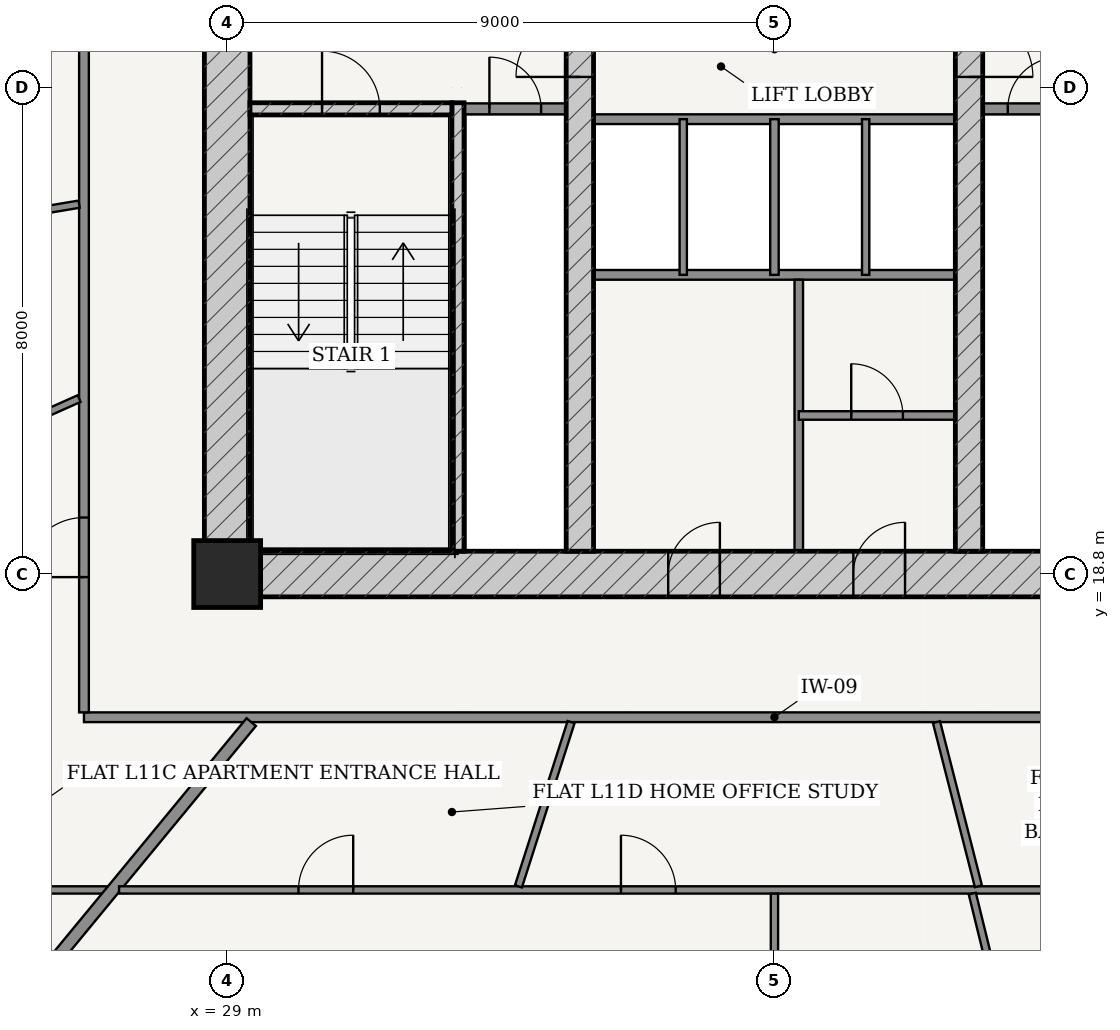
"""IFC4 building model, lengths in metres.
Left out: names, types, materials, properties, quantities, classifications, styles, units other than length and angle.
Written with IfcOpenShell. Run it as: python <this file> out.ifc"""

import sys

from ifc_helpers import new_model, si_unit, direction, frame, frame_2d, origin, origin_2d, place, context, subcontext, project, spatial, rectangle, extrude, source, transform, mapped, element, fill, save


model = new_model("IFC4")
c1 = context("Model", 3, precision=1e-05, world=origin(), true_north=direction((-0.2419218956, 0.970295726276)))
c2 = subcontext(c1, "Body", "Model", "MODEL_VIEW")
j1 = project(units=[si_unit("LENGTHUNIT", "METRE"), si_unit("PLANEANGLEUNIT", "RADIAN")], contexts=[c1])
p1 = place(None, origin())
s1 = spatial("IfcSite", under=j1, at=p1, CompositionType="ELEMENT")
p2 = place(p1, origin())
s2 = spatial("IfcBuilding", under=s1, at=p2, CompositionType="ELEMENT")
p3 = place(p2, frame((0.0, 0.0, 45.6)))
s3 = spatial("IfcBuildingStorey", under=s2, at=p3, CompositionType="ELEMENT", Elevation=45.6)
p4 = place(p3, frame((29.0, 18.8, 0.0), z_axis=(0.0, 0.0, 1.0), x_axis=(1.0, 0.0, 0.0)))
e1 = element("IfcColumn", 1, at=p4, inside=s3, PredefinedType="COLUMN", context=c2, shape_type="SweptSolid", body=[
    extrude(rectangle(XDim=1.1, YDim=1.1, at=origin_2d()), origin(), (0.0, 0.0, 1.0), 3.6),
])
p5 = place(p3, frame((28.625, 18.8, 0.0), z_axis=(0.0, 0.0, 1.0), x_axis=(1.0, 0.0, 0.0)))
e2 = element("IfcWall", 2, at=p5, inside=s3, PredefinedType="SHEAR", context=c2, shape_type="SweptSolid", body=[
    extrude(rectangle(XDim=18.75, YDim=0.75, at=frame_2d((9.375, 0.0))), origin(), (0.0, 0.0, 1.0), 3.32),
])
p6 = place(p5, frame((7.627, 0.0, 0.0)))
e3 = element("IfcOpeningElement", 3, at=p6, cuts=e2, PredefinedType="OPENING", context=c2, shape_type="SweptSolid", body=[
    extrude(rectangle(XDim=0.85, YDim=2.1, at=frame_2d((0.425, 1.05))), frame((0.0, 0.385, 0.0), z_axis=(0.0, -1.0, 0.0), x_axis=(1.0, 0.0, 0.0)), (0.0, 0.0, 1.0), 0.77),
])
p7 = place(p5, frame((10.673, 0.0, 0.0)))
e4 = element("IfcOpeningElement", 4, at=p7, cuts=e2, PredefinedType="OPENING", context=c2, shape_type="SweptSolid", body=[
    extrude(rectangle(XDim=0.85, YDim=2.1, at=frame_2d((0.425, 1.05))), frame((0.0, 0.385, 0.0), z_axis=(0.0, -1.0, 0.0), x_axis=(1.0, 0.0, 0.0)), (0.0, 0.0, 1.0), 0.77),
])
p8 = place(p3, frame((29.0, 19.175, 0.0), z_axis=(0.0, 0.0, 1.0), x_axis=(0.0, 1.0, 0.0)))
e5 = element("IfcWall", 5, at=p8, inside=s3, PredefinedType="SHEAR", context=c2, shape_type="SweptSolid", body=[
    extrude(rectangle(XDim=15.25, YDim=0.75, at=frame_2d((7.625, 0.0))), origin(), (0.0, 0.0, 1.0), 3.32),
])
p9 = place(p8, frame((9.875, 0.0, 0.0)))
e6 = element("IfcOpeningElement", 6, at=p9, cuts=e5, PredefinedType="OPENING", context=c2, shape_type="SweptSolid", body=[
    extrude(rectangle(XDim=1.5, YDim=2.2, at=frame_2d((0.75, 1.1))), frame((0.0, 0.385, 0.0), z_axis=(0.0, -1.0, 0.0), x_axis=(1.0, 0.0, 0.0)), (0.0, 0.0, 1.0), 0.77),
])
p10 = place(p3, frame((32.795, 19.175, 0.0), z_axis=(0.0, 0.0, 1.0), x_axis=(0.0, 1.0, 0.0)))
e7 = element("IfcWall", 7, at=p10, inside=s3, PredefinedType="SOLIDWALL", context=c2, shape_type="SweptSolid", body=[
    extrude(rectangle(XDim=7.375, YDim=0.2, at=frame_2d((3.688, 0.0))), origin(), (0.0, 0.0, 1.0), 3.32),
])
p11 = place(p3, frame((29.375, 26.45, 0.0), z_axis=(0.0, 0.0, 1.0), x_axis=(1.0, 0.0, 0.0)))
e8 = element("IfcWall", 8, at=p11, inside=s3, PredefinedType="SOLIDWALL", context=c2, shape_type="SweptSolid", body=[
    extrude(rectangle(XDim=3.32, YDim=0.2, at=frame_2d((1.66, 0.0))), origin(), (0.0, 0.0, 1.0), 3.32),
])
p12 = place(p11, frame((1.185, 0.0, 0.0)))
e9 = element("IfcOpeningElement", 9, at=p12, cuts=e8, PredefinedType="OPENING", context=c2, shape_type="SweptSolid", body=[
    extrude(rectangle(XDim=0.95, YDim=2.15, at=frame_2d((0.475, 1.075))), frame((0.0, 0.11, 0.0), z_axis=(0.0, -1.0, 0.0), x_axis=(1.0, 0.0, 0.0)), (0.0, 0.0, 1.0), 0.22),
])
p13 = place(p3, frame((34.8, 19.175, 0.0), z_axis=(0.0, 0.0, 1.0), x_axis=(0.0, 1.0, 0.0)))
e10 = element("IfcWall", 10, at=p13, inside=s3, PredefinedType="SHEAR", context=c2, shape_type="SweptSolid", body=[
    extrude(rectangle(XDim=15.25, YDim=0.45, at=frame_2d((7.625, 0.0))), origin(), (0.0, 0.0, 1.0), 3.32),
])
p14 = place(p13, frame((7.8, 0.0, 0.0)))
e11 = element("IfcOpeningElement", 11, at=p14, cuts=e10, PredefinedType="OPENING", context=c2, shape_type="SweptSolid", body=[
    extrude(rectangle(XDim=1.05, YDim=2.15, at=frame_2d((0.525, 1.075))), frame((0.0, 0.235, 0.0), z_axis=(0.0, -1.0, 0.0), x_axis=(1.0, 0.0, 0.0)), (0.0, 0.0, 1.0), 0.47),
])
p15 = place(p3, frame((41.2, 19.175, 0.0), z_axis=(0.0, 0.0, 1.0), x_axis=(0.0, 1.0, 0.0)))
e12 = element("IfcWall", 12, at=p15, inside=s3, PredefinedType="SHEAR", context=c2, shape_type="SweptSolid", body=[
    extrude(rectangle(XDim=15.25, YDim=0.45, at=frame_2d((7.625, 0.0))), origin(), (0.0, 0.0, 1.0), 3.32),
])
p16 = place(p15, frame((7.8, 0.0, 0.0)))
e13 = element("IfcOpeningElement", 13, at=p16, cuts=e12, PredefinedType="OPENING", context=c2, shape_type="SweptSolid", body=[
    extrude(rectangle(XDim=1.05, YDim=2.15, at=frame_2d((0.525, 1.075))), frame((0.0, 0.235, 0.0), z_axis=(0.0, -1.0, 0.0), x_axis=(1.0, 0.0, 0.0)), (0.0, 0.0, 1.0), 0.47),
])
p17 = place(p3, frame((32.9, 26.45, 0.0), z_axis=(0.0, 0.0, 1.0), x_axis=(1.0, 0.0, 0.0)))
e14 = element("IfcWall", 14, at=p17, inside=s3, PredefinedType="PARTITIONING", context=c2, shape_type="SweptSolid", body=[
    extrude(rectangle(XDim=1.675, YDim=0.18, at=frame_2d((0.837, 0.0))), origin(), (0.0, 0.0, 1.0), 3.32),
])
p18 = place(p17, frame((0.413, 0.0, 0.0)))
e15 = element("IfcOpeningElement", 15, at=p18, cuts=e14, PredefinedType="OPENING", context=c2, shape_type="SweptSolid", body=[
    extrude(rectangle(XDim=0.85, YDim=2.1, at=frame_2d((0.425, 1.05))), frame((0.0, 0.1, 0.0), z_axis=(0.0, -1.0, 0.0), x_axis=(1.0, 0.0, 0.0)), (0.0, 0.0, 1.0), 0.2),
])
p19 = place(p3, frame((41.425, 26.45, 0.0), z_axis=(0.0, 0.0, 1.0), x_axis=(1.0, 0.0, 0.0)))
e16 = element("IfcWall", 16, at=p19, inside=s3, PredefinedType="PARTITIONING", context=c2, shape_type="SweptSolid", body=[
    extrude(rectangle(XDim=1.675, YDim=0.18, at=frame_2d((0.837, 0.0))), origin(), (0.0, 0.0, 1.0), 3.32),
])
p20 = place(p19, frame((0.413, 0.0, 0.0)))
e17 = element("IfcOpeningElement", 17, at=p20, cuts=e16, PredefinedType="OPENING", context=c2, shape_type="SweptSolid", body=[
    extrude(rectangle(XDim=0.85, YDim=2.1, at=frame_2d((0.425, 1.05))), frame((0.0, 0.1, 0.0), z_axis=(0.0, -1.0, 0.0), x_axis=(1.0, 0.0, 0.0)), (0.0, 0.0, 1.0), 0.2),
])
for number, where, z_axis, x_axis in (
    (18, (35.025, 26.28, 0.0), (0.0, 0.0, 1.0), (1.0, 0.0, 0.0)),
    (19, (35.025, 23.72, 0.0), (0.0, 0.0, 1.0), (1.0, 0.0, 0.0)),
):
    element("IfcWall", number, at=place(p3, frame(where, z_axis=z_axis, x_axis=x_axis)), inside=s3, PredefinedType="PARTITIONING", context=c2, shape_type="SweptSolid", body=[
        extrude(rectangle(XDim=5.95, YDim=0.16, at=frame_2d((2.975, 0.0))), origin(), (0.0, 0.0, 1.0), 3.32),
    ])
p21 = place(p3, frame((36.5, 23.72, 0.0), z_axis=(0.0, 0.0, 1.0), x_axis=(0.0, 1.0, 0.0)))
e20 = element("IfcWall", 20, at=p21, inside=s3, PredefinedType="PARTITIONING", context=c2, shape_type="SweptSolid", body=[
    extrude(rectangle(XDim=2.56, YDim=0.12, at=frame_2d((1.28, 0.0))), origin(), (0.0, 0.0, 1.0), 3.32),
])
p22 = place(p3, frame((38.0, 23.72, 0.0), z_axis=(0.0, 0.0, 1.0), x_axis=(0.0, 1.0, 0.0)))
e21 = element("IfcWall", 21, at=p22, inside=s3, PredefinedType="PARTITIONING", context=c2, shape_type="SweptSolid", body=[
    extrude(rectangle(XDim=2.56, YDim=0.14, at=frame_2d((1.28, 0.0))), origin(), (0.0, 0.0, 1.0), 3.32),
])
p23 = place(p3, frame((39.5, 23.72, 0.0), z_axis=(0.0, 0.0, 1.0), x_axis=(0.0, 1.0, 0.0)))
e22 = element("IfcWall", 22, at=p23, inside=s3, PredefinedType="PARTITIONING", context=c2, shape_type="SweptSolid", body=[
    extrude(rectangle(XDim=2.56, YDim=0.12, at=frame_2d((1.28, 0.0))), origin(), (0.0, 0.0, 1.0), 3.32),
])
p24 = place(p3, frame((38.4, 19.175, 0.0), z_axis=(0.0, 0.0, 1.0), x_axis=(0.0, 1.0, 0.0)))
e23 = element("IfcWall", 23, at=p24, inside=s3, PredefinedType="PARTITIONING", context=c2, shape_type="SweptSolid", body=[
    extrude(rectangle(XDim=4.465, YDim=0.14, at=frame_2d((2.232, 0.0))), origin(), (0.0, 0.0, 1.0), 3.32),
])
p25 = place(p3, frame((38.4, 21.407, 0.0), z_axis=(0.0, 0.0, 1.0), x_axis=(1.0, 0.0, 0.0)))
e24 = element("IfcWall", 24, at=p25, inside=s3, PredefinedType="PARTITIONING", context=c2, shape_type="SweptSolid", body=[
    extrude(rectangle(XDim=2.575, YDim=0.14, at=frame_2d((1.288, 0.0))), origin(), (0.0, 0.0, 1.0), 3.32),
])
p26 = place(p25, frame((0.863, 0.0, 0.0)))
e25 = element("IfcOpeningElement", 25, at=p26, cuts=e24, PredefinedType="OPENING", context=c2, shape_type="SweptSolid", body=[
    extrude(rectangle(XDim=0.85, YDim=2.1, at=frame_2d((0.425, 1.05))), frame((0.0, 0.08, 0.0), z_axis=(0.0, -1.0, 0.0), x_axis=(1.0, 0.0, 0.0)), (0.0, 0.0, 1.0), 0.16),
])
p27 = place(p3, frame((26.645, 16.445, 0.0), z_axis=(0.0, 0.0, 1.0), x_axis=(1.0, 0.0, 0.0)))
e26 = element("IfcWall", 26, at=p27, inside=s3, PredefinedType="PARTITIONING", context=c2, shape_type="SweptSolid", body=[
    extrude(rectangle(XDim=22.71, YDim=0.16, at=frame_2d((11.355, 0.0))), origin(), (0.0, 0.0, 1.0), 2.688),
])
p28 = place(p27, frame((19.962, 0.0, 0.0)))
e27 = element("IfcOpeningElement", 27, at=p28, cuts=e26, PredefinedType="OPENING", context=c2, shape_type="SweptSolid", body=[
    extrude(rectangle(XDim=0.98, YDim=2.2, at=frame_2d((0.49, 1.1))), frame((0.0, 0.09, 0.0), z_axis=(0.0, -1.0, 0.0), x_axis=(1.0, 0.0, 0.0)), (0.0, 0.0, 1.0), 0.18),
])
p29 = place(p3, frame((26.645, 16.525, 0.0), z_axis=(0.0, 0.0, 1.0), x_axis=(0.0, 1.0, 0.0)))
e28 = element("IfcWall", 28, at=p29, inside=s3, PredefinedType="PARTITIONING", context=c2, shape_type="SweptSolid", body=[
    extrude(rectangle(XDim=20.55, YDim=0.16, at=frame_2d((10.275, 0.0))), origin(), (0.0, 0.0, 1.0), 2.688),
])
p30 = place(p29, frame((2.224, 0.0, 0.0)))
e29 = element("IfcOpeningElement", 29, at=p30, cuts=e28, PredefinedType="OPENING", context=c2, shape_type="SweptSolid", body=[
    extrude(rectangle(XDim=0.98, YDim=2.2, at=frame_2d((0.49, 1.1))), frame((0.0, 0.09, 0.0), z_axis=(0.0, -1.0, 0.0), x_axis=(1.0, 0.0, 0.0)), (0.0, 0.0, 1.0), 0.18),
])
p31 = place(p3, frame((27.018, 13.605, 0.0), z_axis=(0.0, 0.0, 1.0), x_axis=(-1.0, 0.0, 0.0)))
e30 = element("IfcWall", 30, at=p31, inside=s3, PredefinedType="PARTITIONING", context=c2, shape_type="SweptSolid", body=[
    extrude(rectangle(XDim=3.213, YDim=0.12, at=frame_2d((1.606, 0.0))), origin(), (0.0, 0.0, 1.0), 2.688),
])
p32 = place(p3, frame((26.565, 24.883, 0.0), z_axis=(0.0, 0.0, 1.0), x_axis=(-0.986224611599, -0.165411654596, 0.0)))
e31 = element("IfcWall", 31, at=p32, inside=s3, PredefinedType="PARTITIONING", context=c2, shape_type="SweptSolid", body=[
    extrude(rectangle(XDim=2.736, YDim=0.12, at=frame_2d((1.368, 0.0))), origin(), (0.0, 0.0, 1.0), 2.688),
])
p33 = place(p3, frame((26.565, 21.685, 0.0), z_axis=(0.0, 0.0, 1.0), x_axis=(-0.912840085104, -0.408317252914, 0.0)))
e32 = element("IfcWall", 32, at=p33, inside=s3, PredefinedType="PARTITIONING", context=c2, shape_type="SweptSolid", body=[
    extrude(rectangle(XDim=2.961, YDim=0.12, at=frame_2d((1.481, 0.0))), origin(), (0.0, 0.0, 1.0), 3.32),
])
p34 = place(p33, frame((1.051, 0.0, 0.0)))
e33 = element("IfcOpeningElement", 33, at=p34, cuts=e32, PredefinedType="OPENING", context=c2, shape_type="SweptSolid", body=[
    extrude(rectangle(XDim=0.86, YDim=2.15, at=frame_2d((0.43, 1.075))), frame((0.0, 0.07, 0.0), z_axis=(0.0, -1.0, 0.0), x_axis=(1.0, 0.0, 0.0)), (0.0, 0.0, 1.0), 0.14),
])
p35 = place(p3, frame((29.396, 16.365, 0.0), z_axis=(0.0, 0.0, 1.0), x_axis=(-0.636186165667, -0.771535587393, 0.0)))
e34 = element("IfcWall", 34, at=p35, inside=s3, PredefinedType="PARTITIONING", context=c2, shape_type="SweptSolid", body=[
    extrude(rectangle(XDim=11.683, YDim=0.2, at=frame_2d((5.842, 0.0))), origin(), (0.0, 0.0, 1.0), 2.688),
])
p36 = place(p3, frame((52.195, 13.605, 0.0), z_axis=(0.0, 0.0, 1.0), x_axis=(-1.0, 0.0, 0.0)))
e35 = element("IfcWall", 35, at=p36, inside=s3, PredefinedType="PARTITIONING", context=c2, shape_type="SweptSolid", body=[
    extrude(rectangle(XDim=24.973, YDim=0.12, at=frame_2d((12.487, 0.0))), origin(), (0.0, 0.0, 1.0), 2.688),
])
p37 = place(p36, frame((3.841, 0.0, 0.0)))
e36 = element("IfcOpeningElement", 36, at=p37, cuts=e35, PredefinedType="OPENING", context=c2, shape_type="SweptSolid", body=[
    extrude(rectangle(XDim=0.9, YDim=2.15, at=frame_2d((0.45, 1.075))), frame((0.0, 0.07, 0.0), z_axis=(0.0, -1.0, 0.0), x_axis=(1.0, 0.0, 0.0)), (0.0, 0.0, 1.0), 0.14),
])
p38 = place(p36, frame((15.819, 0.0, 0.0)))
e37 = element("IfcOpeningElement", 37, at=p38, cuts=e35, PredefinedType="OPENING", context=c2, shape_type="SweptSolid", body=[
    extrude(rectangle(XDim=0.9, YDim=2.15, at=frame_2d((0.45, 1.075))), frame((0.0, 0.07, 0.0), z_axis=(0.0, -1.0, 0.0), x_axis=(1.0, 0.0, 0.0)), (0.0, 0.0, 1.0), 0.14),
])
p39 = place(p36, frame((21.123, 0.0, 0.0)))
e38 = element("IfcOpeningElement", 38, at=p39, cuts=e35, PredefinedType="OPENING", context=c2, shape_type="SweptSolid", body=[
    extrude(rectangle(XDim=0.9, YDim=2.15, at=frame_2d((0.45, 1.075))), frame((0.0, 0.07, 0.0), z_axis=(0.0, -1.0, 0.0), x_axis=(1.0, 0.0, 0.0)), (0.0, 0.0, 1.0), 0.14),
])
p40 = place(p3, frame((38.0, 13.543, 0.0), z_axis=(0.0, 0.0, 1.0), x_axis=(0.0, -1.0, 0.0)))
e39 = element("IfcWall", 39, at=p40, inside=s3, PredefinedType="PARTITIONING", context=c2, shape_type="SweptSolid", body=[
    extrude(rectangle(XDim=10.183, YDim=0.12, at=frame_2d((5.091, 0.0))), origin(), (0.0, 0.0, 1.0), 2.762),
])
p41 = place(p40, frame((4.642, 0.0, 0.0)))
e40 = element("IfcOpeningElement", 40, at=p41, cuts=e39, PredefinedType="OPENING", context=c2, shape_type="SweptSolid", body=[
    extrude(rectangle(XDim=0.9, YDim=2.15, at=frame_2d((0.45, 1.075))), frame((0.0, 0.07, 0.0), z_axis=(0.0, -1.0, 0.0), x_axis=(1.0, 0.0, 0.0)), (0.0, 0.0, 1.0), 0.14),
])
p42 = place(p3, frame((41.254, 13.545, 0.0), z_axis=(0.0, 0.0, 1.0), x_axis=(0.238391877067, -0.971169044476, 0.0)))
e41 = element("IfcWall", 41, at=p42, inside=s3, PredefinedType="PARTITIONING", context=c2, shape_type="SweptSolid", body=[
    extrude(rectangle(XDim=9.973, YDim=0.12, at=frame_2d((4.986, 0.0))), origin(), (0.0, 0.0, 1.0), 2.688),
])
p43 = place(p42, frame((3.462, 0.0, 0.0)))
e42 = element("IfcOpeningElement", 42, at=p43, cuts=e41, PredefinedType="OPENING", context=c2, shape_type="SweptSolid", body=[
    extrude(rectangle(XDim=0.9, YDim=2.15, at=frame_2d((0.45, 1.075))), frame((0.0, 0.07, 0.0), z_axis=(0.0, -1.0, 0.0), x_axis=(1.0, 0.0, 0.0)), (0.0, 0.0, 1.0), 0.14),
])
p44 = place(p3, frame((34.656, 16.365, 0.0), z_axis=(0.0, 0.0, 1.0), x_axis=(-0.305153630579, -0.952303135427, 0.0)))
e43 = element("IfcWall", 43, at=p44, inside=s3, PredefinedType="PARTITIONING", context=c2, shape_type="SweptSolid", body=[
    extrude(rectangle(XDim=2.836, YDim=0.12, at=frame_2d((1.418, 0.0))), origin(), (0.0, 0.0, 1.0), 3.32),
])
p45 = place(p3, frame((40.665, 16.365, 0.0), z_axis=(0.0, 0.0, 1.0), x_axis=(0.2474182455, -0.968908773721, 0.0)))
e44 = element("IfcWall", 44, at=p45, inside=s3, PredefinedType="PARTITIONING", context=c2, shape_type="SweptSolid", body=[
    extrude(rectangle(XDim=2.787, YDim=0.12, at=frame_2d((1.393, 0.0))), origin(), (0.0, 0.0, 1.0), 2.688),
])
m1 = source(origin(), c2, "Body", "SweptSolid", [
    extrude(rectangle(XDim=1.05, YDim=2.15, at=frame_2d((0.525, 1.075))), frame((0.0, 0.025, 0.0), z_axis=(0.0, -1.0, 0.0), x_axis=(1.0, 0.0, 0.0)), (0.0, 0.0, 1.0), 0.05),
])
p46 = place(p14, origin())
e45 = element("IfcDoor", 45, at=p46, inside=s3, OperationType="SINGLE_SWING_LEFT", PredefinedType="DOOR", context=c2, shape_type="MappedRepresentation", body=[
    mapped(m1, transform((0.0, 0.0, 0.0), scale=1.0)),
])
fill(e11, e45)
p47 = place(p16, frame((1.05, 0.0, 0.0), z_axis=(0.0, 0.0, 1.0), x_axis=(-1.0, 0.0, 0.0)))
e46 = element("IfcDoor", 46, at=p47, inside=s3, OperationType="SINGLE_SWING_RIGHT", PredefinedType="DOOR", context=c2, shape_type="MappedRepresentation", body=[
    mapped(m1, transform((0.0, 0.0, 0.0), scale=1.0)),
])
fill(e13, e46)
m2 = source(origin(), c2, "Body", "SweptSolid", [
    extrude(rectangle(XDim=0.95, YDim=2.15, at=frame_2d((0.475, 1.075))), frame((0.0, 0.025, 0.0), z_axis=(0.0, -1.0, 0.0), x_axis=(1.0, 0.0, 0.0)), (0.0, 0.0, 1.0), 0.05),
])
p48 = place(p12, origin())
e47 = element("IfcDoor", 47, at=p48, inside=s3, OperationType="SINGLE_SWING_LEFT", PredefinedType="DOOR", context=c2, shape_type="MappedRepresentation", body=[
    mapped(m2, transform((0.0, 0.0, 0.0), scale=1.0)),
])
fill(e9, e47)
m3 = source(origin(), c2, "Body", "SweptSolid", [
    extrude(rectangle(XDim=0.85, YDim=2.1, at=frame_2d((0.425, 1.05))), frame((0.0, 0.025, 0.0), z_axis=(0.0, -1.0, 0.0), x_axis=(1.0, 0.0, 0.0)), (0.0, 0.0, 1.0), 0.05),
])
p49 = place(p18, origin())
e48 = element("IfcDoor", 48, at=p49, inside=s3, OperationType="SINGLE_SWING_LEFT", PredefinedType="DOOR", context=c2, shape_type="MappedRepresentation", body=[
    mapped(m3, transform((0.0, 0.0, 0.0), scale=1.0)),
])
fill(e15, e48)
p50 = place(p20, origin())
e49 = element("IfcDoor", 49, at=p50, inside=s3, OperationType="SINGLE_SWING_RIGHT", PredefinedType="DOOR", context=c2, shape_type="MappedRepresentation", body=[
    mapped(m3, transform((0.0, 0.0, 0.0), scale=1.0)),
])
fill(e17, e49)
p51 = place(p6, origin())
e50 = element("IfcDoor", 50, at=p51, inside=s3, OperationType="SINGLE_SWING_RIGHT", PredefinedType="DOOR", context=c2, shape_type="MappedRepresentation", body=[
    mapped(m3, transform((0.0, 0.0, 0.0), scale=1.0)),
])
fill(e3, e50)
p52 = place(p7, origin())
e51 = element("IfcDoor", 51, at=p52, inside=s3, OperationType="SINGLE_SWING_RIGHT", PredefinedType="DOOR", context=c2, shape_type="MappedRepresentation", body=[
    mapped(m3, transform((0.0, 0.0, 0.0), scale=1.0)),
])
fill(e4, e51)
p53 = place(p26, origin())
e52 = element("IfcDoor", 52, at=p53, inside=s3, OperationType="SINGLE_SWING_LEFT", PredefinedType="DOOR", context=c2, shape_type="MappedRepresentation", body=[
    mapped(m3, transform((0.0, 0.0, 0.0), scale=1.0)),
])
fill(e25, e52)
m4 = source(origin(), c2, "Body", "SweptSolid", [
    extrude(rectangle(XDim=0.98, YDim=2.2, at=frame_2d((0.49, 1.1))), frame((0.0, 0.025, 0.0), z_axis=(0.0, -1.0, 0.0), x_axis=(1.0, 0.0, 0.0)), (0.0, 0.0, 1.0), 0.05),
])
p54 = place(p30, origin())
e53 = element("IfcDoor", 53, at=p54, inside=s3, OperationType="SINGLE_SWING_LEFT", PredefinedType="DOOR", context=c2, shape_type="MappedRepresentation", body=[
    mapped(m4, transform((0.0, 0.0, 0.0), scale=1.0)),
])
fill(e29, e53)
m5 = source(origin(), c2, "Body", "SweptSolid", [
    extrude(rectangle(XDim=0.9, YDim=2.15, at=frame_2d((0.45, 1.075))), frame((0.0, 0.025, 0.0), z_axis=(0.0, -1.0, 0.0), x_axis=(1.0, 0.0, 0.0)), (0.0, 0.0, 1.0), 0.05),
])
p55 = place(p38, frame((0.9, 0.0, 0.0), z_axis=(0.0, 0.0, 1.0), x_axis=(-1.0, 0.0, 0.0)))
e54 = element("IfcDoor", 54, at=p55, inside=s3, OperationType="SINGLE_SWING_LEFT", PredefinedType="DOOR", context=c2, shape_type="MappedRepresentation", body=[
    mapped(m5, transform((0.0, 0.0, 0.0), scale=1.0)),
])
fill(e37, e54)
p56 = place(p39, frame((0.9, 0.0, 0.0), z_axis=(0.0, 0.0, 1.0), x_axis=(-1.0, 0.0, 0.0)))
e55 = element("IfcDoor", 55, at=p56, inside=s3, OperationType="SINGLE_SWING_RIGHT", PredefinedType="DOOR", context=c2, shape_type="MappedRepresentation", body=[
    mapped(m5, transform((0.0, 0.0, 0.0), scale=1.0)),
])
fill(e38, e55)
save(model, sys.argv[1])
